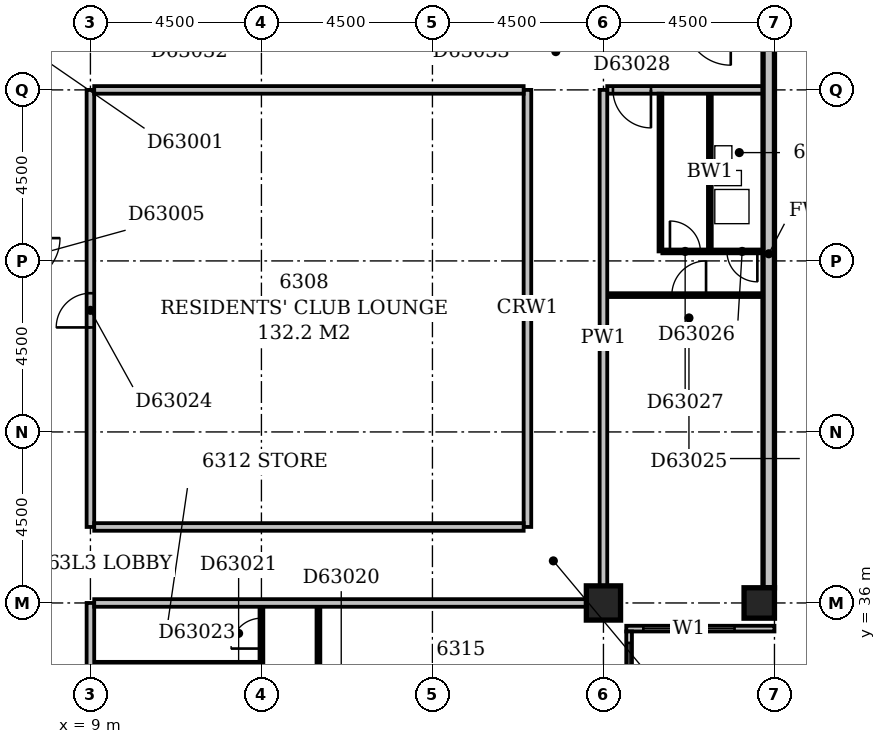
"""IFC4 building model, lengths in metres.
Left out: names, types, materials, properties, quantities, classifications, styles, units other than length and angle.
Written with IfcOpenShell. Run it as: python <this file> out.ifc"""

import sys

from ifc_helpers import new_model, si_unit, direction, frame, frame_2d, origin, origin_2d, place, context, subcontext, project, spatial, rectangle, extrude, element, fill, save


model = new_model("IFC4")
c1 = context("Model", 3, precision=1e-05, world=origin(), true_north=direction((0.0, 1.0)))
c2 = subcontext(c1, "Body", "Model", "MODEL_VIEW")
j1 = project(units=[si_unit("LENGTHUNIT", "METRE"), si_unit("PLANEANGLEUNIT", "RADIAN")], contexts=[c1])
p1 = place(None, origin())
s1 = spatial("IfcSite", under=j1, at=p1, CompositionType="ELEMENT")
p2 = place(p1, origin())
s2 = spatial("IfcBuilding", under=s1, at=p2, CompositionType="ELEMENT")
p3 = place(p2, frame((0.0, 0.0, 243.8)))
s3 = spatial("IfcBuildingStorey", under=s2, at=p3, CompositionType="ELEMENT", Elevation=243.8)
p4 = place(p3, frame((22.5, 36.0, -0.3), z_axis=(0.0, 0.0, 1.0), x_axis=(1.0, 0.0, 0.0)))
e1 = element("IfcColumn", 1, at=p4, inside=s3, PredefinedType="COLUMN", context=c2, shape_type="SweptSolid", body=[
    extrude(rectangle(XDim=0.9, YDim=0.9, at=origin_2d()), origin(), (0.0, 0.0, 1.0), 3.6),
])
p5 = place(p3, frame((26.6, 36.0, -0.3), z_axis=(0.0, 0.0, 1.0), x_axis=(1.0, 0.0, 0.0)))
e2 = element("IfcColumn", 2, at=p5, inside=s3, PredefinedType="COLUMN", context=c2, shape_type="SweptSolid", body=[
    extrude(rectangle(XDim=0.8, YDim=0.8, at=origin_2d()), origin(), (0.0, 0.0, 1.0), 3.6),
])
p6 = place(p3, frame((23.175, 17.4, 0.0), z_axis=(0.0, 0.0, 1.0), x_axis=(0.0, 1.0, 0.0)))
e3 = element("IfcWall", 3, at=p6, inside=s3, PredefinedType="STANDARD", context=c2, shape_type="SweptSolid", body=[
    extrude(rectangle(XDim=17.85, YDim=0.15, at=frame_2d((8.925, 0.0))), origin(), (0.0, 0.0, 1.0), 2.7),
])
p7 = place(p6, frame((1.65, 0.0, 0.6)))
e4 = element("IfcOpeningElement", 4, at=p7, cuts=e3, PredefinedType="OPENING", context=c2, shape_type="SweptSolid", body=[
    extrude(rectangle(XDim=2.4, YDim=1.8, at=frame_2d((1.2, 0.9))), frame((0.0, 0.087, 0.0), z_axis=(0.0, -1.0, 0.0), x_axis=(1.0, 0.0, 0.0)), (0.0, 0.0, 1.0), 0.174),
])
p8 = place(p6, frame((5.901, 0.0, 0.6)))
e5 = element("IfcOpeningElement", 5, at=p8, cuts=e3, PredefinedType="OPENING", context=c2, shape_type="SweptSolid", body=[
    extrude(rectangle(XDim=2.4, YDim=1.8, at=frame_2d((1.2, 0.9))), frame((0.0, 0.087, 0.0), z_axis=(0.0, -1.0, 0.0), x_axis=(1.0, 0.0, 0.0)), (0.0, 0.0, 1.0), 0.174),
])
p9 = place(p6, frame((10.65, 0.0, 0.6)))
e6 = element("IfcOpeningElement", 6, at=p9, cuts=e3, PredefinedType="OPENING", context=c2, shape_type="SweptSolid", body=[
    extrude(rectangle(XDim=2.4, YDim=1.8, at=frame_2d((1.2, 0.9))), frame((0.0, 0.087, 0.0), z_axis=(0.0, -1.0, 0.0), x_axis=(1.0, 0.0, 0.0)), (0.0, 0.0, 1.0), 0.174),
])
p10 = place(p6, frame((15.15, 0.0, 0.6)))
e7 = element("IfcOpeningElement", 7, at=p10, cuts=e3, PredefinedType="OPENING", context=c2, shape_type="SweptSolid", body=[
    extrude(rectangle(XDim=2.4, YDim=1.8, at=frame_2d((1.2, 0.9))), frame((0.0, 0.087, 0.0), z_axis=(0.0, -1.0, 0.0), x_axis=(1.0, 0.0, 0.0)), (0.0, 0.0, 1.0), 0.174),
])
p11 = place(p3, frame((23.1, 35.325, 0.0), z_axis=(0.0, 0.0, 1.0), x_axis=(1.0, 0.0, 0.0)))
e8 = element("IfcWall", 8, at=p11, inside=s3, PredefinedType="STANDARD", context=c2, shape_type="SweptSolid", body=[
    extrude(rectangle(XDim=3.9, YDim=0.15, at=frame_2d((1.95, 0.0))), origin(), (0.0, 0.0, 1.0), 2.7),
])
p12 = place(p11, frame((0.45, 0.0, 0.6)))
e9 = element("IfcOpeningElement", 9, at=p12, cuts=e8, PredefinedType="OPENING", context=c2, shape_type="SweptSolid", body=[
    extrude(rectangle(XDim=2.4, YDim=1.8, at=frame_2d((1.2, 0.9))), frame((0.0, 0.087, 0.0), z_axis=(0.0, -1.0, 0.0), x_axis=(1.0, 0.0, 0.0)), (0.0, 0.0, 1.0), 0.174),
])
p13 = place(p3, frame((26.85, 36.4, 0.0), z_axis=(0.0, 0.0, 1.0), x_axis=(0.0, 1.0, 0.0)))
e10 = element("IfcWall", 10, at=p13, inside=s3, PredefinedType="STANDARD", context=c2, shape_type="SweptSolid", body=[
    extrude(rectangle(XDim=17.575, YDim=0.3, at=frame_2d((8.788, 0.0))), origin(), (0.0, 0.0, 1.0), 3.3),
])
p14 = place(p3, frame((9.0, 18.45, 0.0), z_axis=(0.0, 0.0, 1.0), x_axis=(0.0, 1.0, 0.0)))
e11 = element("IfcWall", 11, at=p14, inside=s3, PredefinedType="PARTITIONING", context=c2, shape_type="SweptSolid", body=[
    extrude(rectangle(XDim=17.55, YDim=0.2, at=frame_2d((8.775, 0.0))), origin(), (0.0, 0.0, 1.0), 3.3),
])
p15 = place(p14, frame((4.35, 0.0, 0.0)))
e12 = element("IfcOpeningElement", 12, at=p15, cuts=e11, PredefinedType="OPENING", context=c2, shape_type="SweptSolid", body=[
    extrude(rectangle(XDim=1.0, YDim=2.1, at=frame_2d((0.5, 1.05))), frame((0.0, 0.112, 0.0), z_axis=(0.0, -1.0, 0.0), x_axis=(1.0, 0.0, 0.0)), (0.0, 0.0, 1.0), 0.224),
])
p16 = place(p14, frame((2.8, 0.0, 0.0)))
e13 = element("IfcOpeningElement", 13, at=p16, cuts=e11, PredefinedType="OPENING", context=c2, shape_type="SweptSolid", body=[
    extrude(rectangle(XDim=1.0, YDim=2.1, at=frame_2d((0.5, 1.05))), frame((0.0, 0.112, 0.0), z_axis=(0.0, -1.0, 0.0), x_axis=(1.0, 0.0, 0.0)), (0.0, 0.0, 1.0), 0.224),
])
p17 = place(p3, frame((15.0, 22.6, 0.0), z_axis=(0.0, 0.0, 1.0), x_axis=(0.0, 1.0, 0.0)))
e14 = element("IfcWall", 14, at=p17, inside=s3, PredefinedType="PARTITIONING", context=c2, shape_type="SweptSolid", body=[
    extrude(rectangle(XDim=13.3, YDim=0.1, at=frame_2d((6.65, 0.0))), origin(), (0.0, 0.0, 1.0), 3.3),
])
p18 = place(p17, frame((1.7, 0.0, 0.0)))
e15 = element("IfcOpeningElement", 15, at=p18, cuts=e14, PredefinedType="OPENING", context=c2, shape_type="SweptSolid", body=[
    extrude(rectangle(XDim=0.9, YDim=2.1, at=frame_2d((0.45, 1.05))), frame((0.0, 0.062, 0.0), z_axis=(0.0, -1.0, 0.0), x_axis=(1.0, 0.0, 0.0)), (0.0, 0.0, 1.0), 0.124),
])
p19 = place(p17, frame((6.2, 0.0, 0.0)))
e16 = element("IfcOpeningElement", 16, at=p19, cuts=e14, PredefinedType="OPENING", context=c2, shape_type="SweptSolid", body=[
    extrude(rectangle(XDim=0.9, YDim=2.1, at=frame_2d((0.45, 1.05))), frame((0.0, 0.062, 0.0), z_axis=(0.0, -1.0, 0.0), x_axis=(1.0, 0.0, 0.0)), (0.0, 0.0, 1.0), 0.124),
])
p20 = place(p17, frame((10.7, 0.0, 0.0)))
e17 = element("IfcOpeningElement", 17, at=p20, cuts=e14, PredefinedType="OPENING", context=c2, shape_type="SweptSolid", body=[
    extrude(rectangle(XDim=0.9, YDim=2.1, at=frame_2d((0.45, 1.05))), frame((0.0, 0.062, 0.0), z_axis=(0.0, -1.0, 0.0), x_axis=(1.0, 0.0, 0.0)), (0.0, 0.0, 1.0), 0.124),
])
p21 = place(p3, frame((13.5, 24.1, 0.0), z_axis=(0.0, 0.0, 1.0), x_axis=(0.0, 1.0, 0.0)))
e18 = element("IfcWall", 18, at=p21, inside=s3, PredefinedType="PARTITIONING", context=c2, shape_type="SweptSolid", body=[
    extrude(rectangle(XDim=11.8, YDim=0.1, at=frame_2d((5.9, 0.0))), origin(), (0.0, 0.0, 1.0), 3.3),
])
p22 = place(p21, frame((8.7, 0.0, 0.0)))
e19 = element("IfcOpeningElement", 19, at=p22, cuts=e18, PredefinedType="OPENING", context=c2, shape_type="SweptSolid", body=[
    extrude(rectangle(XDim=0.8, YDim=2.1, at=frame_2d((0.4, 1.05))), frame((0.0, 0.062, 0.0), z_axis=(0.0, -1.0, 0.0), x_axis=(1.0, 0.0, 0.0)), (0.0, 0.0, 1.0), 0.124),
])
p23 = place(p21, frame((3.5, 0.0, 0.0)))
e20 = element("IfcOpeningElement", 20, at=p23, cuts=e18, PredefinedType="OPENING", context=c2, shape_type="SweptSolid", body=[
    extrude(rectangle(XDim=0.9, YDim=2.1, at=frame_2d((0.45, 1.05))), frame((0.0, 0.062, 0.0), z_axis=(0.0, -1.0, 0.0), x_axis=(1.0, 0.0, 0.0)), (0.0, 0.0, 1.0), 0.124),
])
p24 = place(p21, frame((10.7, 0.0, 0.0)))
e21 = element("IfcOpeningElement", 21, at=p24, cuts=e18, PredefinedType="OPENING", context=c2, shape_type="SweptSolid", body=[
    extrude(rectangle(XDim=0.8, YDim=2.1, at=frame_2d((0.4, 1.05))), frame((0.0, 0.062, 0.0), z_axis=(0.0, -1.0, 0.0), x_axis=(1.0, 0.0, 0.0)), (0.0, 0.0, 1.0), 0.124),
])
p25 = place(p3, frame((9.1, 34.4, 0.0), z_axis=(0.0, 0.0, 1.0), x_axis=(1.0, 0.0, 0.0)))
e22 = element("IfcWall", 22, at=p25, inside=s3, PredefinedType="PLUMBINGWALL", context=c2, shape_type="SweptSolid", body=[
    extrude(rectangle(XDim=4.35, YDim=0.1, at=frame_2d((2.175, 0.0))), origin(), (0.0, 0.0, 1.0), 3.3),
])
p26 = place(p3, frame((9.1, 36.0, 0.0), z_axis=(0.0, 0.0, 1.0), x_axis=(1.0, 0.0, 0.0)))
e23 = element("IfcWall", 23, at=p26, inside=s3, PredefinedType="PARTITIONING", context=c2, shape_type="SweptSolid", body=[
    extrude(rectangle(XDim=12.95, YDim=0.2, at=frame_2d((6.475, 0.0))), origin(), (0.0, 0.0, 1.0), 3.3),
])
p27 = place(p3, frame((22.5, 36.45, 0.0), z_axis=(0.0, 0.0, 1.0), x_axis=(0.0, 1.0, 0.0)))
e24 = element("IfcWall", 24, at=p27, inside=s3, PredefinedType="PARTITIONING", context=c2, shape_type="SweptSolid", body=[
    extrude(rectangle(XDim=13.05, YDim=0.2, at=frame_2d((6.525, 0.0))), origin(), (0.0, 0.0, 1.0), 3.3),
])
p28 = place(p3, frame((9.0, 38.0, 0.0), z_axis=(0.0, 0.0, 1.0), x_axis=(0.0, 1.0, 0.0)))
e25 = element("IfcWall", 25, at=p28, inside=s3, PredefinedType="PARTITIONING", context=c2, shape_type="SweptSolid", body=[
    extrude(rectangle(XDim=11.5, YDim=0.2, at=frame_2d((5.75, 0.0))), origin(), (0.0, 0.0, 1.0), 3.3),
])
p29 = place(p28, frame((5.25, 0.0, 0.0)))
e26 = element("IfcOpeningElement", 26, at=p29, cuts=e25, PredefinedType="OPENING", context=c2, shape_type="SweptSolid", body=[
    extrude(rectangle(XDim=0.9, YDim=2.1, at=frame_2d((0.45, 1.05))), frame((0.0, 0.112, 0.0), z_axis=(0.0, -1.0, 0.0), x_axis=(1.0, 0.0, 0.0)), (0.0, 0.0, 1.0), 0.224),
])
p30 = place(p3, frame((9.1, 38.0, 0.0), z_axis=(0.0, 0.0, 1.0), x_axis=(1.0, 0.0, 0.0)))
e27 = element("IfcWall", 27, at=p30, inside=s3, PredefinedType="PARTITIONING", context=c2, shape_type="SweptSolid", body=[
    extrude(rectangle(XDim=11.3, YDim=0.2, at=frame_2d((5.65, 0.0))), origin(), (0.0, 0.0, 1.0), 3.3),
])
p31 = place(p3, frame((20.5, 38.0, 0.0), z_axis=(0.0, 0.0, 1.0), x_axis=(0.0, 1.0, 0.0)))
e28 = element("IfcWall", 28, at=p31, inside=s3, PredefinedType="PARTITIONING", context=c2, shape_type="SweptSolid", body=[
    extrude(rectangle(XDim=11.5, YDim=0.2, at=frame_2d((5.75, 0.0))), origin(), (0.0, 0.0, 1.0), 3.3),
])
p32 = place(p3, frame((22.6, 44.1, 0.0), z_axis=(0.0, 0.0, 1.0), x_axis=(1.0, 0.0, 0.0)))
e29 = element("IfcWall", 29, at=p32, inside=s3, PredefinedType="PARTITIONING", context=c2, shape_type="SweptSolid", body=[
    extrude(rectangle(XDim=4.4, YDim=0.1, at=frame_2d((2.2, 0.0))), origin(), (0.0, 0.0, 1.0), 3.3),
])
p33 = place(p32, frame((1.7, 0.0, 0.0)))
e30 = element("IfcOpeningElement", 30, at=p33, cuts=e29, PredefinedType="OPENING", context=c2, shape_type="SweptSolid", body=[
    extrude(rectangle(XDim=0.9, YDim=2.1, at=frame_2d((0.45, 1.05))), frame((0.0, 0.062, 0.0), z_axis=(0.0, -1.0, 0.0), x_axis=(1.0, 0.0, 0.0)), (0.0, 0.0, 1.0), 0.124),
])
p34 = place(p3, frame((24.0, 45.25, 0.0), z_axis=(0.0, 0.0, 1.0), x_axis=(0.0, 1.0, 0.0)))
e31 = element("IfcWall", 31, at=p34, inside=s3, PredefinedType="PARTITIONING", context=c2, shape_type="SweptSolid", body=[
    extrude(rectangle(XDim=4.15, YDim=0.1, at=frame_2d((2.075, 0.0))), origin(), (0.0, 0.0, 1.0), 3.3),
])
p35 = place(p3, frame((24.05, 45.25, 0.0), z_axis=(0.0, 0.0, 1.0), x_axis=(1.0, 0.0, 0.0)))
e32 = element("IfcWall", 32, at=p35, inside=s3, PredefinedType="PARTITIONING", context=c2, shape_type="SweptSolid", body=[
    extrude(rectangle(XDim=2.95, YDim=0.1, at=frame_2d((1.475, 0.0))), origin(), (0.0, 0.0, 1.0), 3.3),
])
p36 = place(p35, frame((1.7, 0.0, 0.0)))
e33 = element("IfcOpeningElement", 33, at=p36, cuts=e32, PredefinedType="OPENING", context=c2, shape_type="SweptSolid", body=[
    extrude(rectangle(XDim=0.8, YDim=2.1, at=frame_2d((0.4, 1.05))), frame((0.0, 0.062, 0.0), z_axis=(0.0, -1.0, 0.0), x_axis=(1.0, 0.0, 0.0)), (0.0, 0.0, 1.0), 0.124),
])
p37 = place(p35, frame((0.2, 0.0, 0.0)))
e34 = element("IfcOpeningElement", 34, at=p37, cuts=e32, PredefinedType="OPENING", context=c2, shape_type="SweptSolid", body=[
    extrude(rectangle(XDim=0.8, YDim=2.1, at=frame_2d((0.4, 1.05))), frame((0.0, 0.062, 0.0), z_axis=(0.0, -1.0, 0.0), x_axis=(1.0, 0.0, 0.0)), (0.0, 0.0, 1.0), 0.124),
])
p38 = place(p3, frame((25.3, 45.3, 0.0), z_axis=(0.0, 0.0, 1.0), x_axis=(0.0, 1.0, 0.0)))
e35 = element("IfcWall", 35, at=p38, inside=s3, PredefinedType="PLUMBINGWALL", context=c2, shape_type="SweptSolid", body=[
    extrude(rectangle(XDim=4.1, YDim=0.1, at=frame_2d((2.05, 0.0))), origin(), (0.0, 0.0, 1.0), 3.3),
])
p39 = place(p3, frame((9.1, 49.5, 0.0), z_axis=(0.0, 0.0, 1.0), x_axis=(1.0, 0.0, 0.0)))
e36 = element("IfcWall", 36, at=p39, inside=s3, PredefinedType="PARTITIONING", context=c2, shape_type="SweptSolid", body=[
    extrude(rectangle(XDim=11.3, YDim=0.2, at=frame_2d((5.65, 0.0))), origin(), (0.0, 0.0, 1.0), 3.3),
])
p40 = place(p3, frame((22.6, 49.5, 0.0), z_axis=(0.0, 0.0, 1.0), x_axis=(1.0, 0.0, 0.0)))
e37 = element("IfcWall", 37, at=p40, inside=s3, PredefinedType="PARTITIONING", context=c2, shape_type="SweptSolid", body=[
    extrude(rectangle(XDim=4.4, YDim=0.2, at=frame_2d((2.2, 0.0))), origin(), (0.0, 0.0, 1.0), 3.3),
])
p41 = place(p40, frame((0.15, 0.0, 0.0)))
e38 = element("IfcOpeningElement", 38, at=p41, cuts=e37, PredefinedType="OPENING", context=c2, shape_type="SweptSolid", body=[
    extrude(rectangle(XDim=1.0, YDim=2.1, at=frame_2d((0.5, 1.05))), frame((0.0, 0.112, 0.0), z_axis=(0.0, -1.0, 0.0), x_axis=(1.0, 0.0, 0.0)), (0.0, 0.0, 1.0), 0.224),
])
p42 = place(p10, origin())
e39 = element("IfcWindow", 39, at=p42, inside=s3, PartitioningType="SINGLE_PANEL", PredefinedType="WINDOW", context=c2, shape_type="SweptSolid", body=[
    extrude(rectangle(XDim=2.4, YDim=1.8, at=frame_2d((1.2, 0.9))), frame((0.0, 0.03, 0.0), z_axis=(0.0, -1.0, 0.0), x_axis=(1.0, 0.0, 0.0)), (0.0, 0.0, 1.0), 0.06),
])
fill(e7, e39)
p43 = place(p12, origin())
e40 = element("IfcWindow", 40, at=p43, inside=s3, PartitioningType="SINGLE_PANEL", PredefinedType="WINDOW", context=c2, shape_type="SweptSolid", body=[
    extrude(rectangle(XDim=2.4, YDim=1.8, at=frame_2d((1.2, 0.9))), frame((0.0, 0.03, 0.0), z_axis=(0.0, -1.0, 0.0), x_axis=(1.0, 0.0, 0.0)), (0.0, 0.0, 1.0), 0.06),
])
fill(e9, e40)
p44 = place(p24, origin())
e41 = element("IfcDoor", 41, at=p44, inside=s3, OperationType="SINGLE_SWING_LEFT", PredefinedType="DOOR", context=c2, shape_type="SweptSolid", body=[
    extrude(rectangle(XDim=0.8, YDim=2.1, at=frame_2d((0.4, 1.05))), frame((0.0, 0.025, 0.0), z_axis=(0.0, -1.0, 0.0), x_axis=(1.0, 0.0, 0.0)), (0.0, 0.0, 1.0), 0.05),
])
fill(e21, e41)
p45 = place(p29, origin())
e42 = element("IfcDoor", 42, at=p45, inside=s3, OperationType="SINGLE_SWING_LEFT", PredefinedType="DOOR", context=c2, shape_type="SweptSolid", body=[
    extrude(rectangle(XDim=0.9, YDim=2.1, at=frame_2d((0.45, 1.05))), frame((0.0, 0.025, 0.0), z_axis=(0.0, -1.0, 0.0), x_axis=(1.0, 0.0, 0.0)), (0.0, 0.0, 1.0), 0.05),
])
fill(e26, e42)
p46 = place(p33, frame((0.9, 0.0, 0.0), z_axis=(0.0, 0.0, 1.0), x_axis=(-1.0, 0.0, 0.0)))
e43 = element("IfcDoor", 43, at=p46, inside=s3, OperationType="SINGLE_SWING_LEFT", PredefinedType="DOOR", context=c2, shape_type="SweptSolid", body=[
    extrude(rectangle(XDim=0.9, YDim=2.1, at=frame_2d((0.45, 1.05))), frame((0.0, 0.025, 0.0), z_axis=(0.0, -1.0, 0.0), x_axis=(1.0, 0.0, 0.0)), (0.0, 0.0, 1.0), 0.05),
])
fill(e30, e43)
p47 = place(p36, origin())
e44 = element("IfcDoor", 44, at=p47, inside=s3, OperationType="SINGLE_SWING_RIGHT", PredefinedType="DOOR", context=c2, shape_type="SweptSolid", body=[
    extrude(rectangle(XDim=0.8, YDim=2.1, at=frame_2d((0.4, 1.05))), frame((0.0, 0.025, 0.0), z_axis=(0.0, -1.0, 0.0), x_axis=(1.0, 0.0, 0.0)), (0.0, 0.0, 1.0), 0.05),
])
fill(e33, e44)
p48 = place(p37, origin())
e45 = element("IfcDoor", 45, at=p48, inside=s3, OperationType="SINGLE_SWING_LEFT", PredefinedType="DOOR", context=c2, shape_type="SweptSolid", body=[
    extrude(rectangle(XDim=0.8, YDim=2.1, at=frame_2d((0.4, 1.05))), frame((0.0, 0.025, 0.0), z_axis=(0.0, -1.0, 0.0), x_axis=(1.0, 0.0, 0.0)), (0.0, 0.0, 1.0), 0.05),
])
fill(e34, e45)
p49 = place(p41, origin())
e46 = element("IfcDoor", 46, at=p49, inside=s3, OperationType="SINGLE_SWING_RIGHT", PredefinedType="DOOR", context=c2, shape_type="SweptSolid", body=[
    extrude(rectangle(XDim=1.0, YDim=2.1, at=frame_2d((0.5, 1.05))), frame((0.0, 0.025, 0.0), z_axis=(0.0, -1.0, 0.0), x_axis=(1.0, 0.0, 0.0)), (0.0, 0.0, 1.0), 0.05),
])
fill(e38, e46)
save(model, sys.argv[1])
